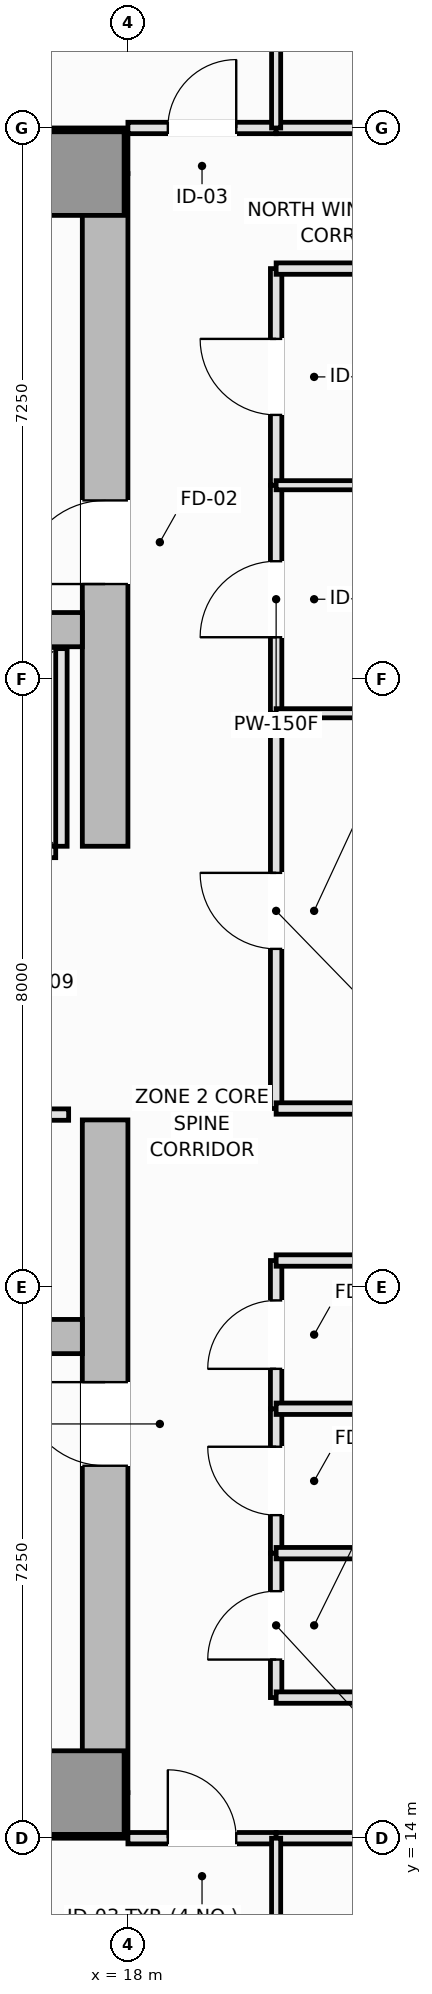
"""IFC4 building model, lengths in metres.
Left out: names, types, materials, properties, quantities, classifications, styles, units other than length and angle.
Written with IfcOpenShell. Run it as: python <this file> out.ifc"""

import sys

from ifc_helpers import new_model, si_unit, direction, frame, frame_2d, origin, origin_2d, place, context, subcontext, project, spatial, rectangle, extrude, element, fill, save


model = new_model("IFC4")
c1 = context("Model", 3, precision=1e-05, world=origin(), true_north=direction((0.0, 1.0)))
c2 = subcontext(c1, "Body", "Model", "MODEL_VIEW")
j1 = project(units=[si_unit("LENGTHUNIT", "METRE"), si_unit("PLANEANGLEUNIT", "RADIAN")], contexts=[c1])
p1 = place(None, origin())
s1 = spatial("IfcSite", under=j1, at=p1, CompositionType="ELEMENT")
p2 = place(p1, origin())
s2 = spatial("IfcBuilding", under=s1, at=p2, CompositionType="ELEMENT")
p3 = place(p2, frame((0.0, 0.0, 169.7)))
s3 = spatial("IfcBuildingStorey", under=s2, at=p3, CompositionType="ELEMENT", Elevation=169.7)
for number, where, z_axis, x_axis in (
    (1, (4.5, 14.3, 0.0), (0.0, 0.0, 1.0), (1.0, 0.0, 0.0)),
    (2, (4.5, 36.2, 0.0), (0.0, 0.0, 1.0), (1.0, 0.0, 0.0)),
):
    element("IfcWall", number, at=place(p3, frame(where, z_axis=z_axis, x_axis=x_axis)), inside=s3, PredefinedType="SHEAR", context=c2, shape_type="SweptSolid", body=[
        extrude(rectangle(XDim=13.5, YDim=0.6, at=frame_2d((6.75, 0.0))), origin(), (0.0, 0.0, 1.0), 3.55),
    ])
p4 = place(p3, frame((17.7, 14.6, 0.0), z_axis=(0.0, 0.0, 1.0), x_axis=(0.0, 1.0, 0.0)))
e3 = element("IfcWall", 3, at=p4, inside=s3, PredefinedType="SHEAR", context=c2, shape_type="SweptSolid", body=[
    extrude(rectangle(XDim=8.85, YDim=0.6, at=frame_2d((4.425, 0.0))), origin(), (0.0, 0.0, 1.0), 3.55),
])
p5 = place(p4, frame((4.3, 0.0, 0.0)))
e4 = element("IfcOpeningElement", 4, at=p5, cuts=e3, PredefinedType="OPENING", context=c2, shape_type="SweptSolid", body=[
    extrude(rectangle(XDim=1.1, YDim=2.15, at=frame_2d((0.55, 1.075))), frame((0.0, 0.31, 0.0), z_axis=(0.0, -1.0, 0.0), x_axis=(1.0, 0.0, 0.0)), (0.0, 0.0, 1.0), 0.62),
])
p6 = place(p3, frame((17.7, 27.05, 0.0), z_axis=(0.0, 0.0, 1.0), x_axis=(0.0, 1.0, 0.0)))
e5 = element("IfcWall", 5, at=p6, inside=s3, PredefinedType="SHEAR", context=c2, shape_type="SweptSolid", body=[
    extrude(rectangle(XDim=8.85, YDim=0.6, at=frame_2d((4.425, 0.0))), origin(), (0.0, 0.0, 1.0), 3.55),
])
p7 = place(p6, frame((3.45, 0.0, 0.0)))
e6 = element("IfcOpeningElement", 6, at=p7, cuts=e5, PredefinedType="OPENING", context=c2, shape_type="SweptSolid", body=[
    extrude(rectangle(XDim=1.1, YDim=2.15, at=frame_2d((0.55, 1.075))), frame((0.0, 0.31, 0.0), z_axis=(0.0, -1.0, 0.0), x_axis=(1.0, 0.0, 0.0)), (0.0, 0.0, 1.0), 0.62),
])
for number, where, z_axis, x_axis in (
    (7, (5.1, 20.6, 0.0), (0.0, 0.0, 1.0), (1.0, 0.0, 0.0)),
    (8, (5.1, 29.9, 0.0), (0.0, 0.0, 1.0), (1.0, 0.0, 0.0)),
):
    element("IfcWall", number, at=place(p3, frame(where, z_axis=z_axis, x_axis=x_axis)), inside=s3, PredefinedType="SHEAR", context=c2, shape_type="SweptSolid", body=[
        extrude(rectangle(XDim=12.3, YDim=0.45, at=frame_2d((6.15, 0.0))), origin(), (0.0, 0.0, 1.0), 3.55),
    ])
for number, where, z_axis, x_axis in (
    (9, (17.4, 14.6, 0.0), (0.0, 0.0, 1.0), (1.0, 0.0, 0.0)),
    (10, (17.4, 35.9, 0.0), (0.0, 0.0, 1.0), (1.0, 0.0, 0.0)),
):
    element("IfcColumn", number, at=place(p3, frame(where, z_axis=z_axis, x_axis=x_axis)), inside=s3, PredefinedType="PILASTER", context=c2, shape_type="SweptSolid", body=[
        extrude(rectangle(XDim=1.1, YDim=1.1, at=origin_2d()), origin(), (0.0, 0.0, 1.0), 3.55),
    ])
p8 = place(p3, frame((14.5, 26.975, 0.0), z_axis=(0.0, 0.0, 1.0), x_axis=(1.0, 0.0, 0.0)))
e11 = element("IfcWall", 11, at=p8, inside=s3, PredefinedType="PARTITIONING", context=c2, shape_type="SweptSolid", body=[
    extrude(rectangle(XDim=2.55, YDim=0.15, at=frame_2d((1.275, 0.0))), origin(), (0.0, 0.0, 1.0), 3.35),
])
p9 = place(p8, frame((0.625, 0.0, 0.0)))
e12 = element("IfcOpeningElement", 12, at=p9, cuts=e11, PredefinedType="OPENING", context=c2, shape_type="SweptSolid", body=[
    extrude(rectangle(XDim=1.3, YDim=2.2, at=frame_2d((0.65, 1.1))), frame((0.0, 0.085, 0.0), z_axis=(0.0, -1.0, 0.0), x_axis=(1.0, 0.0, 0.0)), (0.0, 0.0, 1.0), 0.17),
])
p10 = place(p3, frame((17.125, 27.05, 0.0), z_axis=(0.0, 0.0, 1.0), x_axis=(0.0, 1.0, 0.0)))
e13 = element("IfcWall", 13, at=p10, inside=s3, PredefinedType="PARTITIONING", context=c2, shape_type="SweptSolid", body=[
    extrude(rectangle(XDim=2.6, YDim=0.15, at=frame_2d((1.3, 0.0))), origin(), (0.0, 0.0, 1.0), 3.35),
])
p11 = place(p3, frame((14.33, 23.52, 0.0), z_axis=(0.0, 0.0, 1.0), x_axis=(1.0, 0.0, 0.0)))
e14 = element("IfcWall", 14, at=p11, inside=s3, PredefinedType="PARTITIONING", context=c2, shape_type="SweptSolid", body=[
    extrude(rectangle(XDim=2.89, YDim=0.15, at=frame_2d((1.445, 0.0))), origin(), (0.0, 0.0, 1.0), 3.35),
])
p12 = place(p11, frame((1.053, 0.0, 0.0)))
e15 = element("IfcOpeningElement", 15, at=p12, cuts=e14, PredefinedType="OPENING", context=c2, shape_type="SweptSolid", body=[
    extrude(rectangle(XDim=0.9, YDim=2.1, at=frame_2d((0.45, 1.05))), frame((0.0, 0.085, 0.0), z_axis=(0.0, -1.0, 0.0), x_axis=(1.0, 0.0, 0.0)), (0.0, 0.0, 1.0), 0.17),
])
p13 = place(p3, frame((19.95, 15.85, 0.0), z_axis=(0.0, 0.0, 1.0), x_axis=(0.0, 1.0, 0.0)))
e16 = element("IfcWall", 16, at=p13, inside=s3, PredefinedType="PLUMBINGWALL", context=c2, shape_type="SweptSolid", body=[
    extrude(rectangle(XDim=1.9, YDim=0.15, at=frame_2d((0.95, 0.0))), origin(), (0.0, 0.0, 1.0), 3.35),
])
p14 = place(p13, frame((0.5, 0.0, 0.0)))
e17 = element("IfcOpeningElement", 17, at=p14, cuts=e16, PredefinedType="OPENING", context=c2, shape_type="SweptSolid", body=[
    extrude(rectangle(XDim=0.9, YDim=2.1, at=frame_2d((0.45, 1.05))), frame((0.0, 0.085, 0.0), z_axis=(0.0, -1.0, 0.0), x_axis=(1.0, 0.0, 0.0)), (0.0, 0.0, 1.0), 0.17),
])
p15 = place(p3, frame((19.95, 17.75, 0.0), z_axis=(0.0, 0.0, 1.0), x_axis=(0.0, 1.0, 0.0)))
e18 = element("IfcWall", 18, at=p15, inside=s3, PredefinedType="PLUMBINGWALL", context=c2, shape_type="SweptSolid", body=[
    extrude(rectangle(XDim=1.9, YDim=0.15, at=frame_2d((0.95, 0.0))), origin(), (0.0, 0.0, 1.0), 3.35),
])
p16 = place(p15, frame((0.5, 0.0, 0.0)))
e19 = element("IfcOpeningElement", 19, at=p16, cuts=e18, PredefinedType="OPENING", context=c2, shape_type="SweptSolid", body=[
    extrude(rectangle(XDim=0.9, YDim=2.1, at=frame_2d((0.45, 1.05))), frame((0.0, 0.085, 0.0), z_axis=(0.0, -1.0, 0.0), x_axis=(1.0, 0.0, 0.0)), (0.0, 0.0, 1.0), 0.17),
])
p17 = place(p3, frame((19.95, 19.65, 0.0), z_axis=(0.0, 0.0, 1.0), x_axis=(0.0, 1.0, 0.0)))
e20 = element("IfcWall", 20, at=p17, inside=s3, PredefinedType="PLUMBINGWALL", context=c2, shape_type="SweptSolid", body=[
    extrude(rectangle(XDim=1.95, YDim=0.15, at=frame_2d((0.975, 0.0))), origin(), (0.0, 0.0, 1.0), 3.35),
])
p18 = place(p17, frame((0.525, 0.0, 0.0)))
e21 = element("IfcOpeningElement", 21, at=p18, cuts=e20, PredefinedType="OPENING", context=c2, shape_type="SweptSolid", body=[
    extrude(rectangle(XDim=0.9, YDim=2.1, at=frame_2d((0.45, 1.05))), frame((0.0, 0.085, 0.0), z_axis=(0.0, -1.0, 0.0), x_axis=(1.0, 0.0, 0.0)), (0.0, 0.0, 1.0), 0.17),
])
p19 = place(p3, frame((19.95, 23.6, 0.0), z_axis=(0.0, 0.0, 1.0), x_axis=(0.0, 1.0, 0.0)))
e22 = element("IfcWall", 22, at=p19, inside=s3, PredefinedType="PARTITIONING", context=c2, shape_type="SweptSolid", body=[
    extrude(rectangle(XDim=5.2, YDim=0.15, at=frame_2d((2.6, 0.0))), origin(), (0.0, 0.0, 1.0), 3.35),
])
p20 = place(p19, frame((2.1, 0.0, 0.0)))
e23 = element("IfcOpeningElement", 23, at=p20, cuts=e22, PredefinedType="OPENING", context=c2, shape_type="SweptSolid", body=[
    extrude(rectangle(XDim=1.0, YDim=2.15, at=frame_2d((0.5, 1.075))), frame((0.0, 0.085, 0.0), z_axis=(0.0, -1.0, 0.0), x_axis=(1.0, 0.0, 0.0)), (0.0, 0.0, 1.0), 0.17),
])
p21 = place(p3, frame((19.95, 28.8, 0.0), z_axis=(0.0, 0.0, 1.0), x_axis=(0.0, 1.0, 0.0)))
e24 = element("IfcWall", 24, at=p21, inside=s3, PredefinedType="PARTITIONING", context=c2, shape_type="SweptSolid", body=[
    extrude(rectangle(XDim=3.0, YDim=0.15, at=frame_2d((1.5, 0.0))), origin(), (0.0, 0.0, 1.0), 3.35),
])
p22 = place(p21, frame((1.0, 0.0, 0.0)))
e25 = element("IfcOpeningElement", 25, at=p22, cuts=e24, PredefinedType="OPENING", context=c2, shape_type="SweptSolid", body=[
    extrude(rectangle(XDim=1.0, YDim=2.15, at=frame_2d((0.5, 1.075))), frame((0.0, 0.085, 0.0), z_axis=(0.0, -1.0, 0.0), x_axis=(1.0, 0.0, 0.0)), (0.0, 0.0, 1.0), 0.17),
])
p23 = place(p3, frame((19.95, 31.8, 0.0), z_axis=(0.0, 0.0, 1.0), x_axis=(0.0, 1.0, 0.0)))
e26 = element("IfcWall", 26, at=p23, inside=s3, PredefinedType="PARTITIONING", context=c2, shape_type="SweptSolid", body=[
    extrude(rectangle(XDim=2.85, YDim=0.15, at=frame_2d((1.425, 0.0))), origin(), (0.0, 0.0, 1.0), 3.35),
])
p24 = place(p23, frame((0.925, 0.0, 0.0)))
e27 = element("IfcOpeningElement", 27, at=p24, cuts=e26, PredefinedType="OPENING", context=c2, shape_type="SweptSolid", body=[
    extrude(rectangle(XDim=1.0, YDim=2.15, at=frame_2d((0.5, 1.075))), frame((0.0, 0.085, 0.0), z_axis=(0.0, -1.0, 0.0), x_axis=(1.0, 0.0, 0.0)), (0.0, 0.0, 1.0), 0.17),
])
p25 = place(p3, frame((18.0, 14.0, 0.0), z_axis=(0.0, 0.0, 1.0), x_axis=(1.0, 0.0, 0.0)))
e28 = element("IfcWall", 28, at=p25, inside=s3, PredefinedType="PARTITIONING", context=c2, shape_type="SweptSolid", body=[
    extrude(rectangle(XDim=1.95, YDim=0.15, at=frame_2d((0.975, 0.0))), origin(), (0.0, 0.0, 1.0), 3.35),
])
p26 = place(p25, frame((0.525, 0.0, 0.0)))
e29 = element("IfcOpeningElement", 29, at=p26, cuts=e28, PredefinedType="OPENING", context=c2, shape_type="SweptSolid", body=[
    extrude(rectangle(XDim=0.9, YDim=2.1, at=frame_2d((0.45, 1.05))), frame((0.0, 0.085, 0.0), z_axis=(0.0, -1.0, 0.0), x_axis=(1.0, 0.0, 0.0)), (0.0, 0.0, 1.0), 0.17),
])
p27 = place(p3, frame((18.0, 36.5, 0.0), z_axis=(0.0, 0.0, 1.0), x_axis=(1.0, 0.0, 0.0)))
e30 = element("IfcWall", 30, at=p27, inside=s3, PredefinedType="PARTITIONING", context=c2, shape_type="SweptSolid", body=[
    extrude(rectangle(XDim=1.95, YDim=0.15, at=frame_2d((0.975, 0.0))), origin(), (0.0, 0.0, 1.0), 3.35),
])
p28 = place(p27, frame((0.525, 0.0, 0.0)))
e31 = element("IfcOpeningElement", 31, at=p28, cuts=e30, PredefinedType="OPENING", context=c2, shape_type="SweptSolid", body=[
    extrude(rectangle(XDim=0.9, YDim=2.1, at=frame_2d((0.45, 1.05))), frame((0.0, 0.085, 0.0), z_axis=(0.0, -1.0, 0.0), x_axis=(1.0, 0.0, 0.0)), (0.0, 0.0, 1.0), 0.17),
])
p29 = place(p3, frame((19.95, 21.6, 0.0), z_axis=(0.0, 0.0, 1.0), x_axis=(1.0, 0.0, 0.0)))
e32 = element("IfcWall", 32, at=p29, inside=s3, PredefinedType="PLUMBINGWALL", context=c2, shape_type="SweptSolid", body=[
    extrude(rectangle(XDim=3.65, YDim=0.15, at=frame_2d((1.825, 0.0))), origin(), (0.0, 0.0, 1.0), 3.35),
])
p30 = place(p3, frame((19.95, 23.6, 0.0), z_axis=(0.0, 0.0, 1.0), x_axis=(1.0, 0.0, 0.0)))
e33 = element("IfcWall", 33, at=p30, inside=s3, PredefinedType="PARTITIONING", context=c2, shape_type="SweptSolid", body=[
    extrude(rectangle(XDim=7.55, YDim=0.15, at=frame_2d((3.775, 0.0))), origin(), (0.0, 0.0, 1.0), 3.35),
])
p31 = place(p3, frame((19.95, 15.85, 0.0), z_axis=(0.0, 0.0, 1.0), x_axis=(1.0, 0.0, 0.0)))
e34 = element("IfcWall", 34, at=p31, inside=s3, PredefinedType="PLUMBINGWALL", context=c2, shape_type="SweptSolid", body=[
    extrude(rectangle(XDim=3.65, YDim=0.15, at=frame_2d((1.825, 0.0))), origin(), (0.0, 0.0, 1.0), 3.35),
])
p32 = place(p3, frame((19.95, 14.0, 0.0), z_axis=(0.0, 0.0, 1.0), x_axis=(1.0, 0.0, 0.0)))
e35 = element("IfcWall", 35, at=p32, inside=s3, PredefinedType="PARTITIONING", context=c2, shape_type="SweptSolid", body=[
    extrude(rectangle(XDim=7.55, YDim=0.15, at=frame_2d((3.775, 0.0))), origin(), (0.0, 0.0, 1.0), 3.35),
])
p33 = place(p32, frame((3.275, 0.0, 0.0)))
e36 = element("IfcOpeningElement", 36, at=p33, cuts=e35, PredefinedType="OPENING", context=c2, shape_type="SweptSolid", body=[
    extrude(rectangle(XDim=1.0, YDim=2.15, at=frame_2d((0.5, 1.075))), frame((0.0, 0.085, 0.0), z_axis=(0.0, -1.0, 0.0), x_axis=(1.0, 0.0, 0.0)), (0.0, 0.0, 1.0), 0.17),
])
p34 = place(p3, frame((19.95, 34.65, 0.0), z_axis=(0.0, 0.0, 1.0), x_axis=(1.0, 0.0, 0.0)))
e37 = element("IfcWall", 37, at=p34, inside=s3, PredefinedType="PARTITIONING", context=c2, shape_type="SweptSolid", body=[
    extrude(rectangle(XDim=7.55, YDim=0.15, at=frame_2d((3.775, 0.0))), origin(), (0.0, 0.0, 1.0), 3.35),
])
p35 = place(p3, frame((19.95, 36.5, 0.0), z_axis=(0.0, 0.0, 1.0), x_axis=(1.0, 0.0, 0.0)))
e38 = element("IfcWall", 38, at=p35, inside=s3, PredefinedType="PARTITIONING", context=c2, shape_type="SweptSolid", body=[
    extrude(rectangle(XDim=7.55, YDim=0.15, at=frame_2d((3.775, 0.0))), origin(), (0.0, 0.0, 1.0), 3.35),
])
p36 = place(p35, frame((3.275, 0.0, 0.0)))
e39 = element("IfcOpeningElement", 39, at=p36, cuts=e38, PredefinedType="OPENING", context=c2, shape_type="SweptSolid", body=[
    extrude(rectangle(XDim=1.0, YDim=2.15, at=frame_2d((0.5, 1.075))), frame((0.0, 0.085, 0.0), z_axis=(0.0, -1.0, 0.0), x_axis=(1.0, 0.0, 0.0)), (0.0, 0.0, 1.0), 0.17),
])
for number, where, z_axis, x_axis in (
    (40, (19.95, 17.75, 0.0), (0.0, 0.0, 1.0), (1.0, 0.0, 0.0)),
    (41, (19.95, 19.65, 0.0), (0.0, 0.0, 1.0), (1.0, 0.0, 0.0)),
):
    element("IfcWall", number, at=place(p3, frame(where, z_axis=z_axis, x_axis=x_axis)), inside=s3, PredefinedType="PLUMBINGWALL", context=c2, shape_type="SweptSolid", body=[
        extrude(rectangle(XDim=3.65, YDim=0.15, at=frame_2d((1.825, 0.0))), origin(), (0.0, 0.0, 1.0), 3.35),
    ])
for number, where, z_axis, x_axis in (
    (42, (19.95, 28.8, 0.0), (0.0, 0.0, 1.0), (1.0, 0.0, 0.0)),
    (43, (19.95, 31.8, 0.0), (0.0, 0.0, 1.0), (1.0, 0.0, 0.0)),
):
    element("IfcWall", number, at=place(p3, frame(where, z_axis=z_axis, x_axis=x_axis)), inside=s3, PredefinedType="PARTITIONING", context=c2, shape_type="SweptSolid", body=[
        extrude(rectangle(XDim=7.55, YDim=0.12, at=frame_2d((3.775, 0.0))), origin(), (0.0, 0.0, 1.0), 3.35),
    ])
p37 = place(p3, frame((19.95, 3.51, 0.0), z_axis=(0.0, 0.0, 1.0), x_axis=(0.0, 1.0, 0.0)))
e44 = element("IfcWall", 44, at=p37, inside=s3, PredefinedType="PARTITIONING", context=c2, shape_type="SweptSolid", body=[
    extrude(rectangle(XDim=10.49, YDim=0.12, at=frame_2d((5.245, 0.0))), origin(), (0.0, 0.0, 1.0), 3.35),
])
p38 = place(p3, frame((19.95, 36.5, 0.0), z_axis=(0.0, 0.0, 1.0), x_axis=(0.0, 1.0, 0.0)))
e45 = element("IfcWall", 45, at=p38, inside=s3, PredefinedType="PARTITIONING", context=c2, shape_type="SweptSolid", body=[
    extrude(rectangle(XDim=9.99, YDim=0.12, at=frame_2d((4.995, 0.0))), origin(), (0.0, 0.0, 1.0), 3.35),
])
p39 = place(p5, origin())
e46 = element("IfcDoor", 46, at=p39, inside=s3, OperationType="SINGLE_SWING_RIGHT", PredefinedType="DOOR", context=c2, shape_type="SweptSolid", body=[
    extrude(rectangle(XDim=1.1, YDim=2.15, at=frame_2d((0.55, 1.075))), frame((0.0, 0.025, 0.0), z_axis=(0.0, -1.0, 0.0), x_axis=(1.0, 0.0, 0.0)), (0.0, 0.0, 1.0), 0.05),
])
fill(e4, e46)
p40 = place(p7, origin())
e47 = element("IfcDoor", 47, at=p40, inside=s3, OperationType="SINGLE_SWING_LEFT", PredefinedType="DOOR", context=c2, shape_type="SweptSolid", body=[
    extrude(rectangle(XDim=1.1, YDim=2.15, at=frame_2d((0.55, 1.075))), frame((0.0, 0.025, 0.0), z_axis=(0.0, -1.0, 0.0), x_axis=(1.0, 0.0, 0.0)), (0.0, 0.0, 1.0), 0.05),
])
fill(e6, e47)
p41 = place(p14, origin())
e48 = element("IfcDoor", 48, at=p41, inside=s3, OperationType="SINGLE_SWING_LEFT", PredefinedType="DOOR", context=c2, shape_type="SweptSolid", body=[
    extrude(rectangle(XDim=0.9, YDim=2.1, at=frame_2d((0.45, 1.05))), frame((0.0, 0.025, 0.0), z_axis=(0.0, -1.0, 0.0), x_axis=(1.0, 0.0, 0.0)), (0.0, 0.0, 1.0), 0.05),
])
fill(e17, e48)
p42 = place(p16, origin())
e49 = element("IfcDoor", 49, at=p42, inside=s3, OperationType="SINGLE_SWING_RIGHT", PredefinedType="DOOR", context=c2, shape_type="SweptSolid", body=[
    extrude(rectangle(XDim=0.9, YDim=2.1, at=frame_2d((0.45, 1.05))), frame((0.0, 0.025, 0.0), z_axis=(0.0, -1.0, 0.0), x_axis=(1.0, 0.0, 0.0)), (0.0, 0.0, 1.0), 0.05),
])
fill(e19, e49)
p43 = place(p18, origin())
e50 = element("IfcDoor", 50, at=p43, inside=s3, OperationType="SINGLE_SWING_LEFT", PredefinedType="DOOR", context=c2, shape_type="SweptSolid", body=[
    extrude(rectangle(XDim=0.9, YDim=2.1, at=frame_2d((0.45, 1.05))), frame((0.0, 0.025, 0.0), z_axis=(0.0, -1.0, 0.0), x_axis=(1.0, 0.0, 0.0)), (0.0, 0.0, 1.0), 0.05),
])
fill(e21, e50)
p44 = place(p20, origin())
e51 = element("IfcDoor", 51, at=p44, inside=s3, OperationType="SINGLE_SWING_RIGHT", PredefinedType="DOOR", context=c2, shape_type="SweptSolid", body=[
    extrude(rectangle(XDim=1.0, YDim=2.15, at=frame_2d((0.5, 1.075))), frame((0.0, 0.025, 0.0), z_axis=(0.0, -1.0, 0.0), x_axis=(1.0, 0.0, 0.0)), (0.0, 0.0, 1.0), 0.05),
])
fill(e23, e51)
p45 = place(p22, origin())
e52 = element("IfcDoor", 52, at=p45, inside=s3, OperationType="SINGLE_SWING_LEFT", PredefinedType="DOOR", context=c2, shape_type="SweptSolid", body=[
    extrude(rectangle(XDim=1.0, YDim=2.15, at=frame_2d((0.5, 1.075))), frame((0.0, 0.025, 0.0), z_axis=(0.0, -1.0, 0.0), x_axis=(1.0, 0.0, 0.0)), (0.0, 0.0, 1.0), 0.05),
])
fill(e25, e52)
p46 = place(p24, origin())
e53 = element("IfcDoor", 53, at=p46, inside=s3, OperationType="SINGLE_SWING_RIGHT", PredefinedType="DOOR", context=c2, shape_type="SweptSolid", body=[
    extrude(rectangle(XDim=1.0, YDim=2.15, at=frame_2d((0.5, 1.075))), frame((0.0, 0.025, 0.0), z_axis=(0.0, -1.0, 0.0), x_axis=(1.0, 0.0, 0.0)), (0.0, 0.0, 1.0), 0.05),
])
fill(e27, e53)
p47 = place(p26, origin())
e54 = element("IfcDoor", 54, at=p47, inside=s3, OperationType="SINGLE_SWING_LEFT", PredefinedType="DOOR", context=c2, shape_type="SweptSolid", body=[
    extrude(rectangle(XDim=0.9, YDim=2.1, at=frame_2d((0.45, 1.05))), frame((0.0, 0.025, 0.0), z_axis=(0.0, -1.0, 0.0), x_axis=(1.0, 0.0, 0.0)), (0.0, 0.0, 1.0), 0.05),
])
fill(e29, e54)
p48 = place(p28, origin())
e55 = element("IfcDoor", 55, at=p48, inside=s3, OperationType="SINGLE_SWING_RIGHT", PredefinedType="DOOR", context=c2, shape_type="SweptSolid", body=[
    extrude(rectangle(XDim=0.9, YDim=2.1, at=frame_2d((0.45, 1.05))), frame((0.0, 0.025, 0.0), z_axis=(0.0, -1.0, 0.0), x_axis=(1.0, 0.0, 0.0)), (0.0, 0.0, 1.0), 0.05),
])
fill(e31, e55)
save(model, sys.argv[1])
